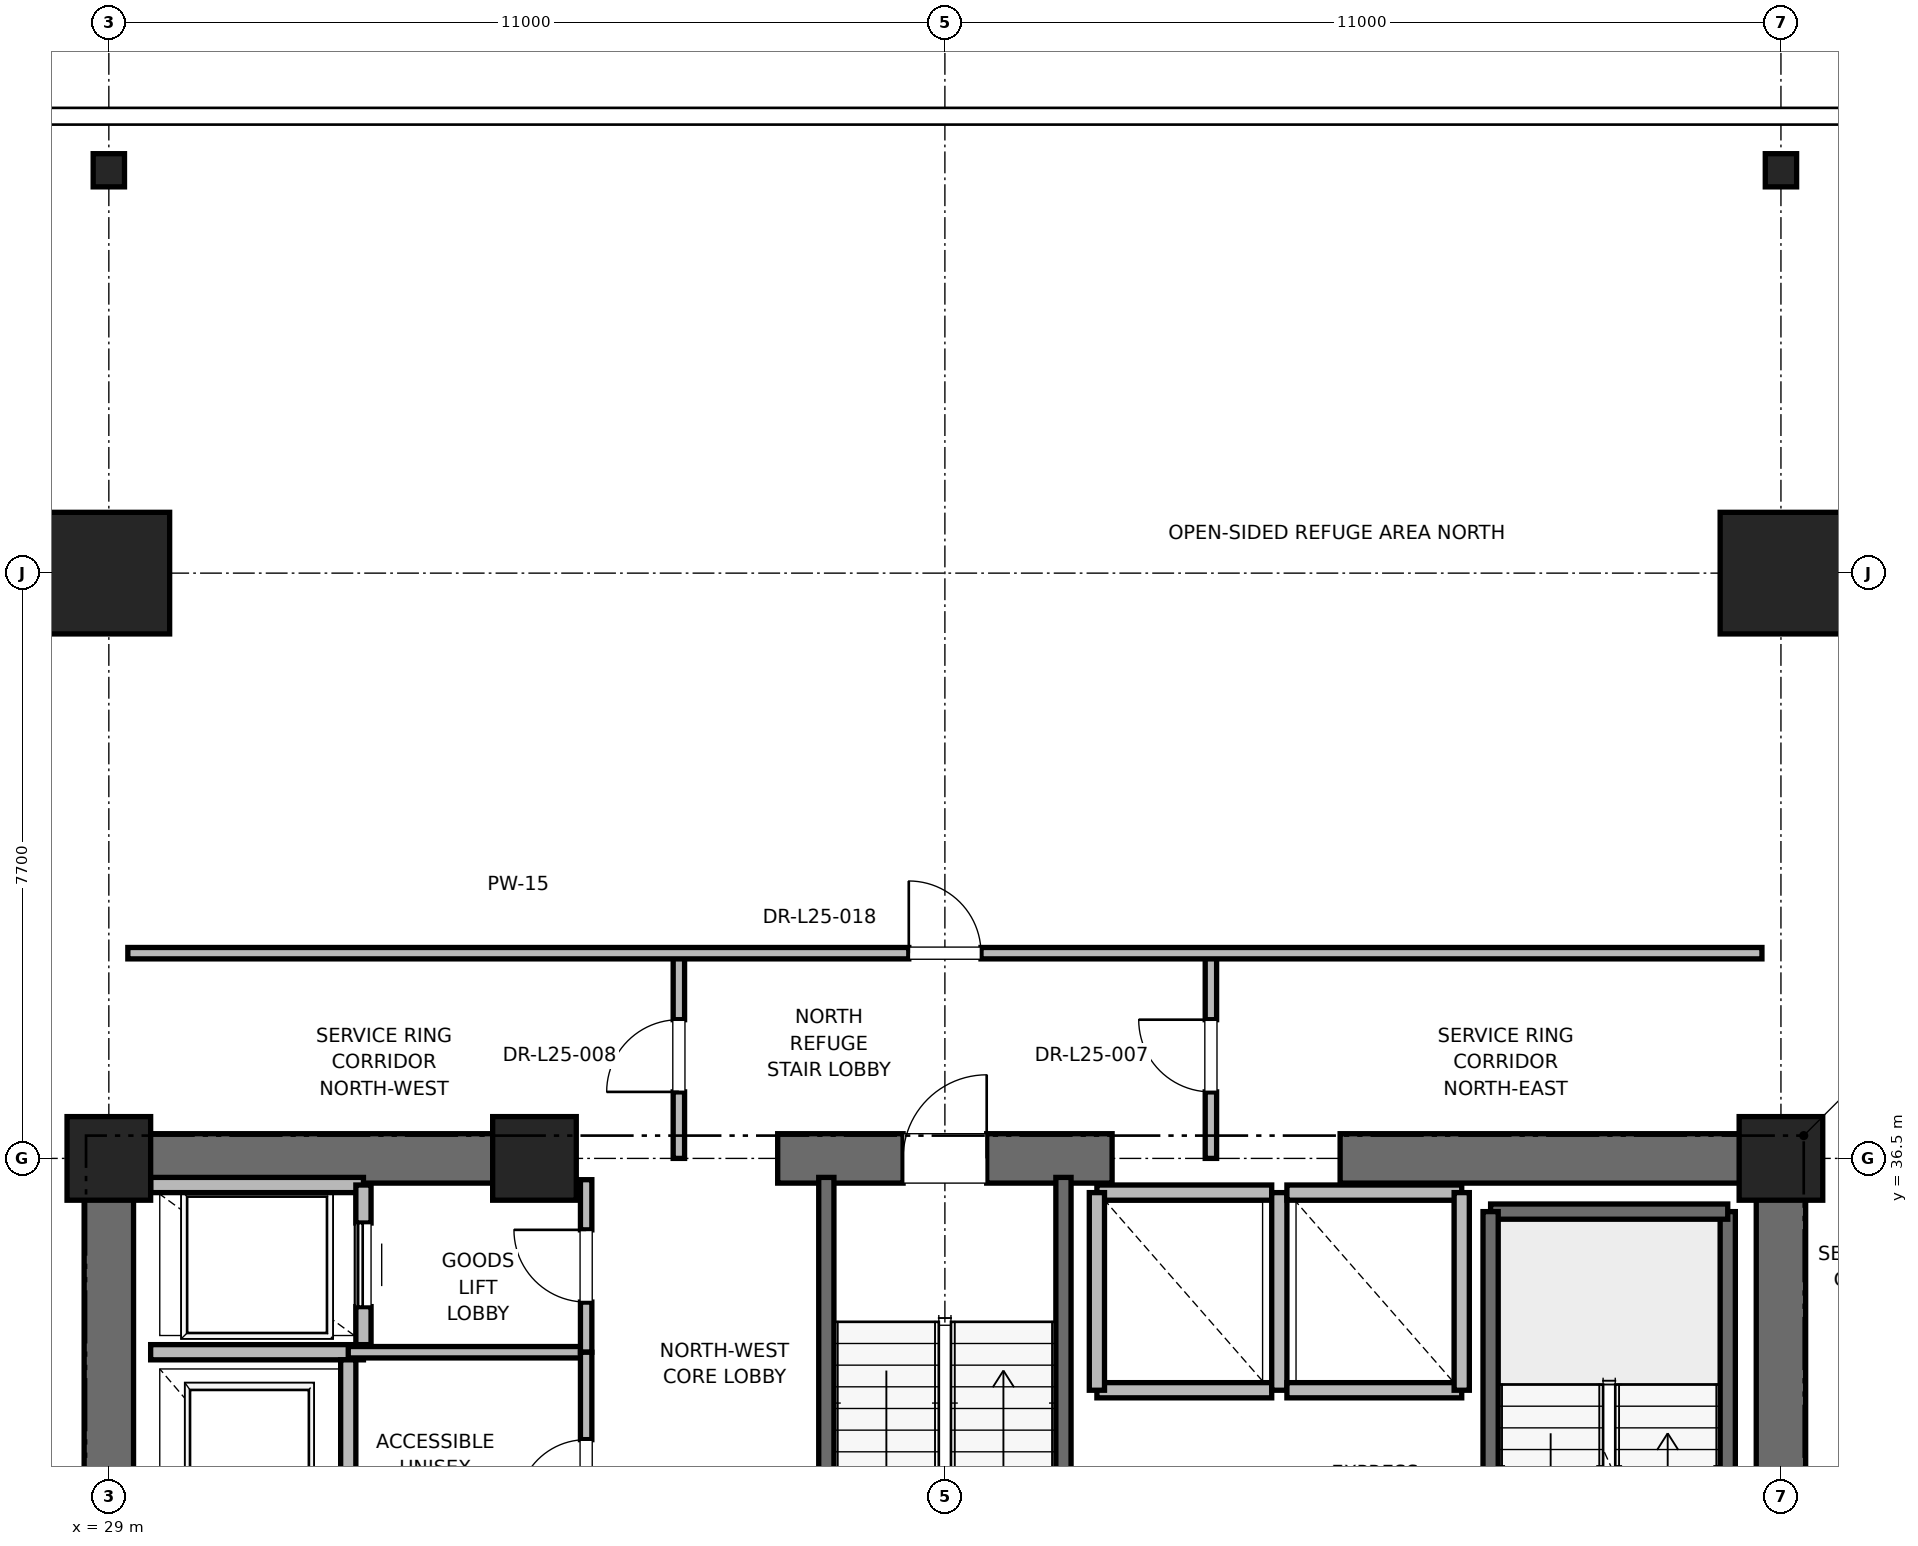
"""IFC4 building model, lengths in metres.
Left out: names, types, materials, properties, quantities, classifications, styles, units other than length and angle.
Written with IfcOpenShell. Run it as: python <this file> out.ifc"""

import sys

from ifc_helpers import new_model, si_unit, direction, frame, frame_2d, origin, origin_2d, place, context, subcontext, project, spatial, rectangle, i_section, extrude, element, fill, save


model = new_model("IFC4")
c1 = context("Model", 3, precision=1e-05, world=origin(), true_north=direction((0.0, 1.0)))
c2 = subcontext(c1, "Body", "Model", "MODEL_VIEW")
j1 = project(units=[si_unit("LENGTHUNIT", "METRE"), si_unit("PLANEANGLEUNIT", "RADIAN")], contexts=[c1])
p1 = place(None, origin())
s1 = spatial("IfcSite", under=j1, at=p1, CompositionType="ELEMENT")
p2 = place(p1, origin())
s2 = spatial("IfcBuilding", under=s1, at=p2, CompositionType="ELEMENT")
p3 = place(p2, frame((0.0, 0.0, 107.6)))
s3 = spatial("IfcBuildingStorey", under=s2, at=p3, CompositionType="ELEMENT", Elevation=107.6)
for number, where, z_axis, x_axis in (
    (1, (29.0, 44.2, 0.0), (0.0, 0.0, 1.0), (1.0, 0.0, 0.0)),
    (2, (51.0, 44.2, 0.0), (0.0, 0.0, 1.0), (1.0, 0.0, 0.0)),
):
    element("IfcColumn", number, at=place(p3, frame(where, z_axis=z_axis, x_axis=x_axis)), inside=s3, PredefinedType="COLUMN", context=c2, shape_type="SweptSolid", body=[
        extrude(rectangle(XDim=1.6, YDim=1.6, at=origin_2d()), origin(), (0.0, 0.0, 1.0), 5.4),
    ])
for number, where, z_axis, x_axis in (
    (3, (29.0, 49.5, 0.0), (0.0, 0.0, 1.0), (1.0, 0.0, 0.0)),
    (4, (51.0, 49.5, 0.0), (0.0, 0.0, 1.0), (1.0, 0.0, 0.0)),
):
    element("IfcColumn", number, at=place(p3, frame(where, z_axis=z_axis, x_axis=x_axis)), inside=s3, PredefinedType="COLUMN", context=c2, shape_type="SweptSolid", body=[
        extrude(i_section(OverallWidth=0.412, OverallDepth=0.437, WebThickness=0.036, FlangeThickness=0.058, FilletRadius=0.015, at=origin_2d()), origin(), (0.0, 0.0, 1.0), 5.4),
    ])
for number, where, z_axis, x_axis in (
    (5, (29.0, 36.5, 0.0), (0.0, 0.0, 1.0), (1.0, 0.0, 0.0)),
    (6, (51.0, 36.5, 0.0), (0.0, 0.0, 1.0), (1.0, 0.0, 0.0)),
    (7, (34.6, 36.5, 0.0), (0.0, 0.0, 1.0), (1.0, 0.0, 0.0)),
):
    element("IfcColumn", number, at=place(p3, frame(where, z_axis=z_axis, x_axis=x_axis)), inside=s3, PredefinedType="PILASTER", context=c2, shape_type="SweptSolid", body=[
        extrude(rectangle(XDim=1.1, YDim=1.1, at=origin_2d()), origin(), (0.0, 0.0, 1.0), 5.4),
    ])
p4 = place(p3, frame((29.0, 36.5, 0.0), z_axis=(0.0, 0.0, 1.0), x_axis=(1.0, 0.0, 0.0)))
e8 = element("IfcWall", 8, at=p4, inside=s3, PredefinedType="SHEAR", context=c2, shape_type="SweptSolid", body=[
    extrude(rectangle(XDim=5.8, YDim=0.65, at=frame_2d((2.9, 0.0))), origin(), (0.0, 0.0, 1.0), 5.1),
])
p5 = place(p3, frame((37.8, 36.5, 0.0), z_axis=(0.0, 0.0, 1.0), x_axis=(1.0, 0.0, 0.0)))
e9 = element("IfcWall", 9, at=p5, inside=s3, PredefinedType="SHEAR", context=c2, shape_type="SweptSolid", body=[
    extrude(rectangle(XDim=4.4, YDim=0.65, at=frame_2d((2.2, 0.0))), origin(), (0.0, 0.0, 1.0), 5.1),
])
p6 = place(p5, frame((1.65, 0.0, 0.0)))
e10 = element("IfcOpeningElement", 10, at=p6, cuts=e9, PredefinedType="OPENING", context=c2, shape_type="SweptSolid", body=[
    extrude(rectangle(XDim=1.1, YDim=2.15, at=frame_2d((0.55, 1.075))), frame((0.0, 0.325, 0.0), z_axis=(0.0, -1.0, 0.0), x_axis=(1.0, 0.0, 0.0)), (0.0, 0.0, 1.0), 0.65),
])
for number, where, z_axis, x_axis in (
    (11, (45.2, 36.5, 0.0), (0.0, 0.0, 1.0), (1.0, 0.0, 0.0)),
    (12, (29.0, 30.7, 0.0), (0.0, 0.0, 1.0), (0.0, 1.0, 0.0)),
):
    element("IfcWall", number, at=place(p3, frame(where, z_axis=z_axis, x_axis=x_axis)), inside=s3, PredefinedType="SHEAR", context=c2, shape_type="SweptSolid", body=[
        extrude(rectangle(XDim=5.8, YDim=0.65, at=frame_2d((2.9, 0.0))), origin(), (0.0, 0.0, 1.0), 5.1),
    ])
p7 = place(p3, frame((51.0, 27.7, 0.0), z_axis=(0.0, 0.0, 1.0), x_axis=(0.0, 1.0, 0.0)))
e13 = element("IfcWall", 13, at=p7, inside=s3, PredefinedType="SHEAR", context=c2, shape_type="SweptSolid", body=[
    extrude(rectangle(XDim=8.8, YDim=0.65, at=frame_2d((4.4, 0.0))), origin(), (0.0, 0.0, 1.0), 5.1),
])
p8 = place(p3, frame((50.3, 27.65, 0.0), z_axis=(0.0, 0.0, 1.0), x_axis=(0.0, 1.0, 0.0)))
e14 = element("IfcWall", 14, at=p8, inside=s3, PredefinedType="SOLIDWALL", context=c2, shape_type="SweptSolid", body=[
    extrude(rectangle(XDim=8.15, YDim=0.2, at=frame_2d((4.075, 0.0))), origin(), (0.0, 0.0, 1.0), 5.1),
])
p9 = place(p3, frame((47.18, 35.8, 0.0), z_axis=(0.0, 0.0, 1.0), x_axis=(1.0, 0.0, 0.0)))
e15 = element("IfcWall", 15, at=p9, inside=s3, PredefinedType="SOLIDWALL", context=c2, shape_type="SweptSolid", body=[
    extrude(rectangle(XDim=3.12, YDim=0.2, at=frame_2d((1.56, 0.0))), origin(), (0.0, 0.0, 1.0), 5.1),
])
p10 = place(p3, frame((47.18, 27.62, 0.0), z_axis=(0.0, 0.0, 1.0), x_axis=(0.0, 1.0, 0.0)))
e16 = element("IfcWall", 16, at=p10, inside=s3, PredefinedType="SOLIDWALL", context=c2, shape_type="SweptSolid", body=[
    extrude(rectangle(XDim=8.18, YDim=0.2, at=frame_2d((4.09, 0.0))), origin(), (0.0, 0.0, 1.0), 5.1),
])
p11 = place(p3, frame((38.44, 27.38, 0.0), z_axis=(0.0, 0.0, 1.0), x_axis=(0.0, 1.0, 0.0)))
e17 = element("IfcWall", 17, at=p11, inside=s3, PredefinedType="SOLIDWALL", context=c2, shape_type="SweptSolid", body=[
    extrude(rectangle(XDim=8.87, YDim=0.2, at=frame_2d((4.435, 0.0))), origin(), (0.0, 0.0, 1.0), 5.1),
])
p12 = place(p3, frame((41.56, 27.68, 0.0), z_axis=(0.0, 0.0, 1.0), x_axis=(0.0, 1.0, 0.0)))
e18 = element("IfcWall", 18, at=p12, inside=s3, PredefinedType="SOLIDWALL", context=c2, shape_type="SweptSolid", body=[
    extrude(rectangle(XDim=8.57, YDim=0.2, at=frame_2d((4.285, 0.0))), origin(), (0.0, 0.0, 1.0), 5.1),
])
p13 = place(p3, frame((29.55, 33.95, 0.0), z_axis=(0.0, 0.0, 1.0), x_axis=(1.0, 0.0, 0.0)))
e19 = element("IfcWall", 19, at=p13, inside=s3, PredefinedType="SOLIDWALL", context=c2, shape_type="SweptSolid", body=[
    extrude(rectangle(XDim=2.8, YDim=0.2, at=frame_2d((1.4, 0.0))), origin(), (0.0, 0.0, 1.0), 5.1),
])
p14 = place(p3, frame((32.15, 30.85, 0.0), z_axis=(0.0, 0.0, 1.0), x_axis=(0.0, 1.0, 0.0)))
e20 = element("IfcWall", 20, at=p14, inside=s3, PredefinedType="SOLIDWALL", context=c2, shape_type="SweptSolid", body=[
    extrude(rectangle(XDim=3.0, YDim=0.2, at=frame_2d((1.5, 0.0))), origin(), (0.0, 0.0, 1.0), 5.1),
])
p15 = place(p3, frame((32.35, 36.15, 0.0), z_axis=(0.0, 0.0, 1.0), x_axis=(-1.0, 0.0, 0.0)))
e21 = element("IfcWall", 21, at=p15, inside=s3, PredefinedType="SOLIDWALL", context=c2, shape_type="SweptSolid", body=[
    extrude(rectangle(XDim=2.8, YDim=0.2, at=frame_2d((1.4, 0.0))), origin(), (0.0, 0.0, 1.0), 4.153),
])
p16 = place(p3, frame((32.35, 34.05, 0.0), z_axis=(0.0, 0.0, 1.0), x_axis=(0.0, 1.0, 0.0)))
e22 = element("IfcWall", 22, at=p16, inside=s3, PredefinedType="SOLIDWALL", context=c2, shape_type="SweptSolid", body=[
    extrude(rectangle(XDim=2.1, YDim=0.2, at=frame_2d((1.05, 0.0))), origin(), (0.0, 0.0, 1.0), 5.1),
])
p17 = place(p16, frame((0.5, 0.0, 0.0)))
e23 = element("IfcOpeningElement", 23, at=p17, cuts=e22, PredefinedType="OPENING", context=c2, shape_type="SweptSolid", body=[
    extrude(rectangle(XDim=1.1, YDim=2.2, at=frame_2d((0.55, 1.1))), frame((0.0, 0.1, 0.0), z_axis=(0.0, -1.0, 0.0), x_axis=(1.0, 0.0, 0.0)), (0.0, 0.0, 1.0), 0.2),
])
p18 = place(p3, frame((42.0, 33.45, 0.0), z_axis=(0.0, 0.0, 1.0), x_axis=(1.0, 0.0, 0.0)))
e24 = element("IfcWall", 24, at=p18, inside=s3, PredefinedType="SOLIDWALL", context=c2, shape_type="SweptSolid", body=[
    extrude(rectangle(XDim=2.3, YDim=0.2, at=frame_2d((1.15, 0.0))), origin(), (0.0, 0.0, 1.0), 5.1),
])
p19 = place(p3, frame((44.3, 36.05, 0.0), z_axis=(0.0, 0.0, 1.0), x_axis=(-1.0, 0.0, 0.0)))
e25 = element("IfcWall", 25, at=p19, inside=s3, PredefinedType="SOLIDWALL", context=c2, shape_type="SweptSolid", body=[
    extrude(rectangle(XDim=2.3, YDim=0.2, at=frame_2d((1.15, 0.0))), origin(), (0.0, 0.0, 1.0), 3.88),
])
for number, where, z_axis, x_axis in (
    (26, (42.0, 36.05, 0.0), (0.0, 0.0, 1.0), (0.0, -1.0, 0.0)),
    (27, (44.4, 33.45, 0.0), (0.0, 0.0, 1.0), (0.0, 1.0, 0.0)),
):
    element("IfcWall", number, at=place(p3, frame(where, z_axis=z_axis, x_axis=x_axis)), inside=s3, PredefinedType="SOLIDWALL", context=c2, shape_type="SweptSolid", body=[
        extrude(rectangle(XDim=2.6, YDim=0.2, at=frame_2d((1.3, 0.0))), origin(), (0.0, 0.0, 1.0), 3.88),
    ])
p20 = place(p3, frame((44.5, 33.45, 0.0), z_axis=(0.0, 0.0, 1.0), x_axis=(1.0, 0.0, 0.0)))
e28 = element("IfcWall", 28, at=p20, inside=s3, PredefinedType="SOLIDWALL", context=c2, shape_type="SweptSolid", body=[
    extrude(rectangle(XDim=2.3, YDim=0.2, at=frame_2d((1.15, 0.0))), origin(), (0.0, 0.0, 1.0), 5.1),
])
p21 = place(p3, frame((46.8, 36.05, 0.0), z_axis=(0.0, 0.0, 1.0), x_axis=(-1.0, 0.0, 0.0)))
e29 = element("IfcWall", 29, at=p21, inside=s3, PredefinedType="SOLIDWALL", context=c2, shape_type="SweptSolid", body=[
    extrude(rectangle(XDim=2.3, YDim=0.2, at=frame_2d((1.15, 0.0))), origin(), (0.0, 0.0, 1.0), 3.88),
])
p22 = place(p3, frame((46.8, 33.45, 0.0), z_axis=(0.0, 0.0, 1.0), x_axis=(0.0, 1.0, 0.0)))
e30 = element("IfcWall", 30, at=p22, inside=s3, PredefinedType="SOLIDWALL", context=c2, shape_type="SweptSolid", body=[
    extrude(rectangle(XDim=2.6, YDim=0.2, at=frame_2d((1.3, 0.0))), origin(), (0.0, 0.0, 1.0), 5.1),
])
p23 = place(p3, frame((32.15, 33.95, 0.0), z_axis=(0.0, 0.0, 1.0), x_axis=(1.0, 0.0, 0.0)))
e31 = element("IfcWall", 31, at=p23, inside=s3, PredefinedType="PARTITIONING", context=c2, shape_type="SweptSolid", body=[
    extrude(rectangle(XDim=3.13, YDim=0.15, at=frame_2d((1.565, 0.0))), origin(), (0.0, 0.0, 1.0), 2.85),
])
p24 = place(p3, frame((35.28, 33.95, 0.0), z_axis=(0.0, 0.0, 1.0), x_axis=(0.0, 1.0, 0.0)))
e32 = element("IfcWall", 32, at=p24, inside=s3, PredefinedType="PARTITIONING", context=c2, shape_type="SweptSolid", body=[
    extrude(rectangle(XDim=2.27, YDim=0.15, at=frame_2d((1.135, 0.0))), origin(), (0.0, 0.0, 1.0), 2.85),
])
p25 = place(p24, frame((0.66, 0.0, 0.0)))
e33 = element("IfcOpeningElement", 33, at=p25, cuts=e32, PredefinedType="OPENING", context=c2, shape_type="SweptSolid", body=[
    extrude(rectangle(XDim=0.95, YDim=2.15, at=frame_2d((0.475, 1.075))), frame((0.0, 0.075, 0.0), z_axis=(0.0, -1.0, 0.0), x_axis=(1.0, 0.0, 0.0)), (0.0, 0.0, 1.0), 0.15),
])
p26 = place(p3, frame((35.28, 30.75, 0.0), z_axis=(0.0, 0.0, 1.0), x_axis=(0.0, 1.0, 0.0)))
e34 = element("IfcWall", 34, at=p26, inside=s3, PredefinedType="PARTITIONING", context=c2, shape_type="SweptSolid", body=[
    extrude(rectangle(XDim=3.2, YDim=0.15, at=frame_2d((1.6, 0.0))), origin(), (0.0, 0.0, 1.0), 2.85),
])
p27 = place(p26, frame((1.15, 0.0, 0.0)))
e35 = element("IfcOpeningElement", 35, at=p27, cuts=e34, PredefinedType="OPENING", context=c2, shape_type="SweptSolid", body=[
    extrude(rectangle(XDim=0.9, YDim=2.1, at=frame_2d((0.45, 1.05))), frame((0.0, 0.075, 0.0), z_axis=(0.0, -1.0, 0.0), x_axis=(1.0, 0.0, 0.0)), (0.0, 0.0, 1.0), 0.15),
])
p28 = place(p3, frame((36.5, 36.5, 0.0), z_axis=(0.0, 0.0, 1.0), x_axis=(0.0, 1.0, 0.0)))
e36 = element("IfcWall", 36, at=p28, inside=s3, PredefinedType="PARTITIONING", context=c2, shape_type="SweptSolid", body=[
    extrude(rectangle(XDim=2.7, YDim=0.15, at=frame_2d((1.35, 0.0))), origin(), (0.0, 0.0, 1.0), 2.85),
])
p29 = place(p28, frame((0.875, 0.0, 0.0)))
e37 = element("IfcOpeningElement", 37, at=p29, cuts=e36, PredefinedType="OPENING", context=c2, shape_type="SweptSolid", body=[
    extrude(rectangle(XDim=0.95, YDim=2.15, at=frame_2d((0.475, 1.075))), frame((0.0, 0.075, 0.0), z_axis=(0.0, -1.0, 0.0), x_axis=(1.0, 0.0, 0.0)), (0.0, 0.0, 1.0), 0.15),
])
p30 = place(p3, frame((43.5, 36.5, 0.0), z_axis=(0.0, 0.0, 1.0), x_axis=(0.0, 1.0, 0.0)))
e38 = element("IfcWall", 38, at=p30, inside=s3, PredefinedType="PARTITIONING", context=c2, shape_type="SweptSolid", body=[
    extrude(rectangle(XDim=2.7, YDim=0.15, at=frame_2d((1.35, 0.0))), origin(), (0.0, 0.0, 1.0), 2.85),
])
p31 = place(p30, frame((0.875, 0.0, 0.0)))
e39 = element("IfcOpeningElement", 39, at=p31, cuts=e38, PredefinedType="OPENING", context=c2, shape_type="SweptSolid", body=[
    extrude(rectangle(XDim=0.95, YDim=2.15, at=frame_2d((0.475, 1.075))), frame((0.0, 0.075, 0.0), z_axis=(0.0, -1.0, 0.0), x_axis=(1.0, 0.0, 0.0)), (0.0, 0.0, 1.0), 0.15),
])
p32 = place(p3, frame((29.25, 39.2, 0.0), z_axis=(0.0, 0.0, 1.0), x_axis=(1.0, 0.0, 0.0)))
e40 = element("IfcWall", 40, at=p32, inside=s3, PredefinedType="PARTITIONING", context=c2, shape_type="SweptSolid", body=[
    extrude(rectangle(XDim=21.5, YDim=0.15, at=frame_2d((10.75, 0.0))), origin(), (0.0, 0.0, 1.0), 2.85),
])
p33 = place(p32, frame((10.275, 0.0, 0.0)))
e41 = element("IfcOpeningElement", 41, at=p33, cuts=e40, PredefinedType="OPENING", context=c2, shape_type="SweptSolid", body=[
    extrude(rectangle(XDim=0.95, YDim=2.15, at=frame_2d((0.475, 1.075))), frame((0.0, 0.075, 0.0), z_axis=(0.0, -1.0, 0.0), x_axis=(1.0, 0.0, 0.0)), (0.0, 0.0, 1.0), 0.15),
])
p34 = place(p6, origin())
e42 = element("IfcDoor", 42, at=p34, inside=s3, OperationType="SINGLE_SWING_RIGHT", PredefinedType="DOOR", context=c2, shape_type="SweptSolid", body=[
    extrude(rectangle(XDim=1.1, YDim=2.15, at=frame_2d((0.55, 1.075))), frame((0.0, 0.025, 0.0), z_axis=(0.0, -1.0, 0.0), x_axis=(1.0, 0.0, 0.0)), (0.0, 0.0, 1.0), 0.05),
])
fill(e10, e42)
p35 = place(p17, origin())
e43 = element("IfcDoor", 43, at=p35, inside=s3, OperationType="SLIDING_TO_RIGHT", PredefinedType="DOOR", context=c2, shape_type="SweptSolid", body=[
    extrude(rectangle(XDim=1.1, YDim=2.2, at=frame_2d((0.55, 1.1))), frame((0.0, 0.025, 0.0), z_axis=(0.0, -1.0, 0.0), x_axis=(1.0, 0.0, 0.0)), (0.0, 0.0, 1.0), 0.05),
])
fill(e23, e43)
p36 = place(p25, origin())
e44 = element("IfcDoor", 44, at=p36, inside=s3, OperationType="SINGLE_SWING_RIGHT", PredefinedType="DOOR", context=c2, shape_type="SweptSolid", body=[
    extrude(rectangle(XDim=0.95, YDim=2.15, at=frame_2d((0.475, 1.075))), frame((0.0, 0.025, 0.0), z_axis=(0.0, -1.0, 0.0), x_axis=(1.0, 0.0, 0.0)), (0.0, 0.0, 1.0), 0.05),
])
fill(e33, e44)
p37 = place(p27, origin())
e45 = element("IfcDoor", 45, at=p37, inside=s3, OperationType="SINGLE_SWING_LEFT", PredefinedType="DOOR", context=c2, shape_type="SweptSolid", body=[
    extrude(rectangle(XDim=0.9, YDim=2.1, at=frame_2d((0.45, 1.05))), frame((0.0, 0.025, 0.0), z_axis=(0.0, -1.0, 0.0), x_axis=(1.0, 0.0, 0.0)), (0.0, 0.0, 1.0), 0.05),
])
fill(e35, e45)
p38 = place(p29, origin())
e46 = element("IfcDoor", 46, at=p38, inside=s3, OperationType="SINGLE_SWING_LEFT", PredefinedType="DOOR", context=c2, shape_type="SweptSolid", body=[
    extrude(rectangle(XDim=0.95, YDim=2.15, at=frame_2d((0.475, 1.075))), frame((0.0, 0.025, 0.0), z_axis=(0.0, -1.0, 0.0), x_axis=(1.0, 0.0, 0.0)), (0.0, 0.0, 1.0), 0.05),
])
fill(e37, e46)
p39 = place(p31, origin())
e47 = element("IfcDoor", 47, at=p39, inside=s3, OperationType="SINGLE_SWING_RIGHT", PredefinedType="DOOR", context=c2, shape_type="SweptSolid", body=[
    extrude(rectangle(XDim=0.95, YDim=2.15, at=frame_2d((0.475, 1.075))), frame((0.0, 0.025, 0.0), z_axis=(0.0, -1.0, 0.0), x_axis=(1.0, 0.0, 0.0)), (0.0, 0.0, 1.0), 0.05),
])
fill(e39, e47)
p40 = place(p33, origin())
e48 = element("IfcDoor", 48, at=p40, inside=s3, OperationType="SINGLE_SWING_LEFT", PredefinedType="DOOR", context=c2, shape_type="SweptSolid", body=[
    extrude(rectangle(XDim=0.95, YDim=2.15, at=frame_2d((0.475, 1.075))), frame((0.0, 0.025, 0.0), z_axis=(0.0, -1.0, 0.0), x_axis=(1.0, 0.0, 0.0)), (0.0, 0.0, 1.0), 0.05),
])
fill(e41, e48)
save(model, sys.argv[1])
